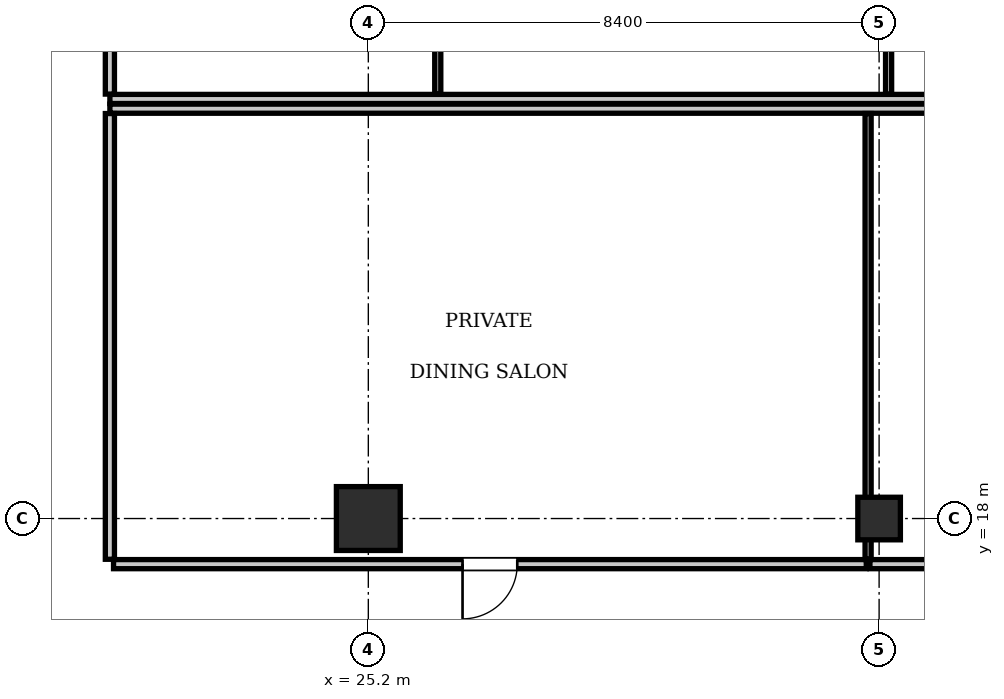
"""IFC4 building model, lengths in metres.
Left out: names, types, materials, properties, quantities, classifications, styles, units other than length and angle.
Written with IfcOpenShell. Run it as: python <this file> out.ifc"""

import sys

from ifc_helpers import new_model, si_unit, direction, frame, frame_2d, origin, origin_2d, place, context, subcontext, project, spatial, rectangle, i_section, extrude, element, fill, save


model = new_model("IFC4")
c1 = context("Model", 3, precision=1e-05, world=origin(), true_north=direction((0.0, 1.0)))
c2 = subcontext(c1, "Body", "Model", "MODEL_VIEW")
j1 = project(units=[si_unit("LENGTHUNIT", "METRE"), si_unit("PLANEANGLEUNIT", "RADIAN")], contexts=[c1])
p1 = place(None, origin())
s1 = spatial("IfcSite", under=j1, at=p1, CompositionType="ELEMENT")
p2 = place(p1, origin())
s2 = spatial("IfcBuilding", under=s1, at=p2, CompositionType="ELEMENT")
p3 = place(p2, frame((0.0, 0.0, 100.1)))
s3 = spatial("IfcBuildingStorey", under=s2, at=p3, CompositionType="ELEMENT", Elevation=100.1)
p4 = place(p3, frame((25.2, 18.0, 0.0), z_axis=(0.0, 0.0, 1.0), x_axis=(1.0, 0.0, 0.0)))
e1 = element("IfcColumn", 1, at=p4, inside=s3, PredefinedType="COLUMN", context=c2, shape_type="SweptSolid", body=[
    extrude(rectangle(XDim=1.05, YDim=1.05, at=origin_2d()), origin(), (0.0, 0.0, 1.0), 3.85),
])
p5 = place(p3, frame((33.6, 18.0, 0.0), z_axis=(0.0, 0.0, 1.0), x_axis=(1.0, 0.0, 0.0)))
e2 = element("IfcColumn", 2, at=p5, inside=s3, PredefinedType="COLUMN", context=c2, shape_type="SweptSolid", body=[
    extrude(i_section(OverallWidth=0.7, OverallDepth=0.7, WebThickness=0.028, FlangeThickness=0.044, at=origin_2d()), origin(), (0.0, 0.0, 1.0), 3.85),
])
p6 = place(p3, frame((20.95, 24.9, 0.0), z_axis=(0.0, 0.0, 1.0), x_axis=(1.0, 0.0, 0.0)))
e3 = element("IfcWall", 3, at=p6, inside=s3, PredefinedType="PARTITIONING", context=c2, shape_type="SweptSolid", body=[
    extrude(rectangle(XDim=33.7, YDim=0.15, at=frame_2d((16.85, 0.0))), origin(), (0.0, 0.0, 1.0), 3.61),
])
p7 = place(p3, frame((20.95, 24.98, 0.0), z_axis=(0.0, 0.0, 1.0), x_axis=(0.0, 1.0, 0.0)))
e4 = element("IfcWall", 4, at=p7, inside=s3, PredefinedType="PARTITIONING", context=c2, shape_type="SweptSolid", body=[
    extrude(rectangle(XDim=7.34, YDim=0.15, at=frame_2d((3.67, 0.0))), origin(), (0.0, 0.0, 1.0), 3.255),
])
p8 = place(p3, frame((26.342, 24.98, 0.0), z_axis=(0.0, 0.0, 1.0), x_axis=(0.0, 1.0, 0.0)))
e5 = element("IfcWall", 5, at=p8, inside=s3, PredefinedType="PARTITIONING", context=c2, shape_type="SweptSolid", body=[
    extrude(rectangle(XDim=7.34, YDim=0.1, at=frame_2d((3.67, 0.0))), origin(), (0.0, 0.0, 1.0), 3.61),
])
p9 = place(p3, frame((33.756, 24.98, 0.0), z_axis=(0.0, 0.0, 1.0), x_axis=(0.0, 1.0, 0.0)))
e6 = element("IfcWall", 6, at=p9, inside=s3, PredefinedType="PARTITIONING", context=c2, shape_type="SweptSolid", body=[
    extrude(rectangle(XDim=7.34, YDim=0.1, at=frame_2d((3.67, 0.0))), origin(), (0.0, 0.0, 1.0), 2.999),
])
p10 = place(p3, frame((20.95, 24.74, 0.0), z_axis=(0.0, 0.0, 1.0), x_axis=(1.0, 0.0, 0.0)))
e7 = element("IfcWall", 7, at=p10, inside=s3, PredefinedType="PARTITIONING", context=c2, shape_type="SweptSolid", body=[
    extrude(rectangle(XDim=33.7, YDim=0.15, at=frame_2d((16.85, 0.0))), origin(), (0.0, 0.0, 1.0), 3.61),
])
p11 = place(p3, frame((20.95, 17.33, 0.0), z_axis=(0.0, 0.0, 1.0), x_axis=(0.0, 1.0, 0.0)))
e8 = element("IfcWall", 8, at=p11, inside=s3, PredefinedType="PARTITIONING", context=c2, shape_type="SweptSolid", body=[
    extrude(rectangle(XDim=7.33, YDim=0.15, at=frame_2d((3.665, 0.0))), origin(), (0.0, 0.0, 1.0), 3.255),
])
p12 = place(p3, frame((21.01, 17.25, 0.0), z_axis=(0.0, 0.0, 1.0), x_axis=(1.0, 0.0, 0.0)))
e9 = element("IfcWall", 9, at=p12, inside=s3, PredefinedType="PARTITIONING", context=c2, shape_type="SweptSolid", body=[
    extrude(rectangle(XDim=12.379, YDim=0.15, at=frame_2d((6.189, 0.0))), origin(), (0.0, 0.0, 1.0), 3.61),
])
p13 = place(p12, frame((5.74, 0.0, 0.0)))
e10 = element("IfcOpeningElement", 10, at=p13, cuts=e9, PredefinedType="OPENING", context=c2, shape_type="SweptSolid", body=[
    extrude(rectangle(XDim=0.9, YDim=2.1, at=frame_2d((0.45, 1.05))), frame((0.0, 0.085, 0.0), z_axis=(0.0, -1.0, 0.0), x_axis=(1.0, 0.0, 0.0)), (0.0, 0.0, 1.0), 0.17),
])
p14 = place(p3, frame((33.419, 17.33, 0.0), z_axis=(0.0, 0.0, 1.0), x_axis=(0.0, 1.0, 0.0)))
e11 = element("IfcWall", 11, at=p14, inside=s3, PredefinedType="PARTITIONING", context=c2, shape_type="SweptSolid", body=[
    extrude(rectangle(XDim=7.33, YDim=0.1, at=frame_2d((3.665, 0.0))), origin(), (0.0, 0.0, 1.0), 2.999),
])
p15 = place(p3, frame((33.449, 17.25, 0.0), z_axis=(0.0, 0.0, 1.0), x_axis=(1.0, 0.0, 0.0)))
e12 = element("IfcWall", 12, at=p15, inside=s3, PredefinedType="PARTITIONING", context=c2, shape_type="SweptSolid", body=[
    extrude(rectangle(XDim=21.141, YDim=0.15, at=frame_2d((10.571, 0.0))), origin(), (0.0, 0.0, 1.0), 3.61),
])
p16 = place(p15, frame((10.121, 0.0, 0.0)))
e13 = element("IfcOpeningElement", 13, at=p16, cuts=e12, PredefinedType="OPENING", context=c2, shape_type="SweptSolid", body=[
    extrude(rectangle(XDim=0.9, YDim=2.1, at=frame_2d((0.45, 1.05))), frame((0.0, 0.085, 0.0), z_axis=(0.0, -1.0, 0.0), x_axis=(1.0, 0.0, 0.0)), (0.0, 0.0, 1.0), 0.17),
])
p17 = place(p13, frame((0.9, 0.0, 0.0), z_axis=(0.0, 0.0, 1.0), x_axis=(-1.0, 0.0, 0.0)))
e14 = element("IfcDoor", 14, at=p17, inside=s3, OperationType="SINGLE_SWING_RIGHT", PredefinedType="DOOR", context=c2, shape_type="SweptSolid", body=[
    extrude(rectangle(XDim=0.9, YDim=2.1, at=frame_2d((0.45, 1.05))), frame((0.0, 0.025, 0.0), z_axis=(0.0, -1.0, 0.0), x_axis=(1.0, 0.0, 0.0)), (0.0, 0.0, 1.0), 0.05),
])
fill(e10, e14)
save(model, sys.argv[1])
